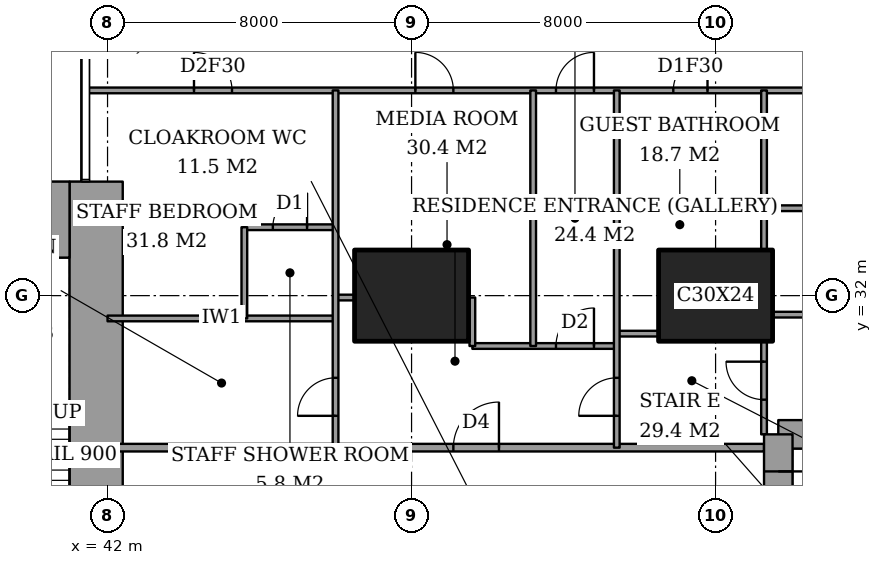
"""IFC4 building model, lengths in metres.
Left out: names, types, materials, properties, quantities, classifications, styles, units other than length and angle.
Written with IfcOpenShell. Run it as: python <this file> out.ifc"""

import sys

from ifc_helpers import new_model, si_unit, direction, frame, frame_2d, origin, origin_2d, place, context, subcontext, project, spatial, rectangle, extrude, element, fill, save


model = new_model("IFC4")
c1 = context("Model", 3, precision=1e-05, world=origin(), true_north=direction((0.0, 1.0)))
c2 = subcontext(c1, "Body", "Model", "MODEL_VIEW")
j1 = project(units=[si_unit("LENGTHUNIT", "METRE"), si_unit("PLANEANGLEUNIT", "RADIAN")], contexts=[c1])
p1 = place(None, origin())
s1 = spatial("IfcSite", under=j1, at=p1, CompositionType="ELEMENT")
p2 = place(p1, origin())
s2 = spatial("IfcBuilding", under=s1, at=p2, CompositionType="ELEMENT")
p3 = place(p2, frame((0.0, 0.0, 270.0)))
s3 = spatial("IfcBuildingStorey", under=s2, at=p3, CompositionType="ELEMENT", Elevation=270.0)
for number, where, z_axis, x_axis in (
    (1, (50.0, 32.0, 0.0), (0.0, 0.0, 1.0), (1.0, 0.0, 0.0)),
    (2, (58.0, 32.0, 0.0), (0.0, 0.0, 1.0), (1.0, 0.0, 0.0)),
):
    element("IfcColumn", number, at=place(p3, frame(where, z_axis=z_axis, x_axis=x_axis)), inside=s3, PredefinedType="COLUMN", context=c2, shape_type="SweptSolid", body=[
        extrude(rectangle(XDim=3.0, YDim=2.4, at=origin_2d()), origin(), (0.0, 0.0, 1.0), 3.6),
    ])
p4 = place(p3, frame((37.85, 34.0, 0.0), z_axis=(0.0, 0.0, 1.0), x_axis=(1.0, 0.0, 0.0)))
e3 = element("IfcWall", 3, at=p4, inside=s3, PredefinedType="SHEAR", context=c2, shape_type="SweptSolid", body=[
    extrude(rectangle(XDim=3.15, YDim=2.0, at=frame_2d((1.575, 0.0))), origin(), (0.0, 0.0, 1.0), 3.6),
])
p5 = place(p3, frame((41.7, 24.85, 0.0), z_axis=(0.0, 0.0, 1.0), x_axis=(0.0, 1.0, 0.0)))
e4 = element("IfcWall", 4, at=p5, inside=s3, PredefinedType="SHEAR", context=c2, shape_type="SweptSolid", body=[
    extrude(rectangle(XDim=10.15, YDim=1.4, at=frame_2d((5.075, 0.0))), origin(), (0.0, 0.0, 1.0), 3.6),
])
p6 = place(p3, frame((64.1, 28.35, 0.0), z_axis=(0.0, 0.0, 1.0), x_axis=(-1.0, 0.0, 0.0)))
e5 = element("IfcWall", 5, at=p6, inside=s3, PredefinedType="SHEAR", context=c2, shape_type="SweptSolid", body=[
    extrude(rectangle(XDim=4.45, YDim=0.75, at=frame_2d((2.225, 0.0))), origin(), (0.0, 0.0, 1.0), 3.6),
])
p7 = place(p3, frame((59.65, 28.35, 0.0), z_axis=(0.0, 0.0, 1.0), x_axis=(0.0, -1.0, 0.0)))
e6 = element("IfcWall", 6, at=p7, inside=s3, PredefinedType="SHEAR", context=c2, shape_type="SweptSolid", body=[
    extrude(rectangle(XDim=8.7, YDim=0.75, at=frame_2d((4.35, 0.0))), origin(), (0.0, 0.0, 1.0), 3.6),
])
p8 = place(p7, frame((0.975, 0.0, 0.0)))
e7 = element("IfcOpeningElement", 7, at=p8, cuts=e6, PredefinedType="OPENING", context=c2, shape_type="SweptSolid", body=[
    extrude(rectangle(XDim=1.0, YDim=2.1, at=frame_2d((0.5, 1.05))), frame((0.0, 0.385, 0.0), z_axis=(0.0, -1.0, 0.0), x_axis=(1.0, 0.0, 0.0)), (0.0, 0.0, 1.0), 0.77),
])
p9 = place(p3, frame((42.0, 28.0, 0.0), z_axis=(0.0, 0.0, 1.0), x_axis=(1.0, 0.0, 0.0)))
e8 = element("IfcWall", 8, at=p9, inside=s3, PredefinedType="PARTITIONING", context=c2, shape_type="SweptSolid", body=[
    extrude(rectangle(XDim=17.275, YDim=0.2, at=frame_2d((8.637, 0.0))), origin(), (0.0, 0.0, 1.0), 3.35),
])
p10 = place(p9, frame((9.1, 0.0, 0.0)))
e9 = element("IfcOpeningElement", 9, at=p10, cuts=e8, PredefinedType="OPENING", context=c2, shape_type="SweptSolid", body=[
    extrude(rectangle(XDim=1.2, YDim=2.4, at=frame_2d((0.6, 1.2))), frame((0.0, 0.11, 0.0), z_axis=(0.0, -1.0, 0.0), x_axis=(1.0, 0.0, 0.0)), (0.0, 0.0, 1.0), 0.22),
])
p11 = place(p3, frame((51.6, 30.675, 0.0), z_axis=(0.0, 0.0, 1.0), x_axis=(1.0, 0.0, 0.0)))
e10 = element("IfcWall", 10, at=p11, inside=s3, PredefinedType="PARTITIONING", context=c2, shape_type="SweptSolid", body=[
    extrude(rectangle(XDim=3.8, YDim=0.15, at=frame_2d((1.9, 0.0))), origin(), (0.0, 0.0, 1.0), 3.35),
])
p12 = place(p11, frame((2.2, 0.0, 0.0)))
e11 = element("IfcOpeningElement", 11, at=p12, cuts=e10, PredefinedType="OPENING", context=c2, shape_type="SweptSolid", body=[
    extrude(rectangle(XDim=1.0, YDim=2.1, at=frame_2d((0.5, 1.05))), frame((0.0, 0.085, 0.0), z_axis=(0.0, -1.0, 0.0), x_axis=(1.0, 0.0, 0.0)), (0.0, 0.0, 1.0), 0.17),
])
p13 = place(p3, frame((55.4, 31.0, 0.0), z_axis=(0.0, 0.0, 1.0), x_axis=(1.0, 0.0, 0.0)))
e12 = element("IfcWall", 12, at=p13, inside=s3, PredefinedType="PARTITIONING", context=c2, shape_type="SweptSolid", body=[
    extrude(rectangle(XDim=1.1, YDim=0.15, at=frame_2d((0.55, 0.0))), origin(), (0.0, 0.0, 1.0), 3.35),
])
p14 = place(p3, frame((42.0, 31.4, 0.0), z_axis=(0.0, 0.0, 1.0), x_axis=(1.0, 0.0, 0.0)))
e13 = element("IfcWall", 13, at=p14, inside=s3, PredefinedType="PARTITIONING", context=c2, shape_type="SweptSolid", body=[
    extrude(rectangle(XDim=6.0, YDim=0.15, at=frame_2d((3.0, 0.0))), origin(), (0.0, 0.0, 1.0), 3.35),
])
p15 = place(p3, frame((59.5, 31.5, 0.0), z_axis=(0.0, 0.0, 1.0), x_axis=(1.0, 0.0, 0.0)))
e14 = element("IfcWall", 14, at=p15, inside=s3, PredefinedType="PARTITIONING", context=c2, shape_type="SweptSolid", body=[
    extrude(rectangle(XDim=5.35, YDim=0.15, at=frame_2d((2.675, 0.0))), origin(), (0.0, 0.0, 1.0), 3.35),
])
p16 = place(p3, frame((48.0, 31.95, 0.0), z_axis=(0.0, 0.0, 1.0), x_axis=(1.0, 0.0, 0.0)))
e15 = element("IfcWall", 15, at=p16, inside=s3, PredefinedType="PARTITIONING", context=c2, shape_type="SweptSolid", body=[
    extrude(rectangle(XDim=0.5, YDim=0.15, at=frame_2d((0.25, 0.0))), origin(), (0.0, 0.0, 1.0), 2.634),
])
p17 = place(p3, frame((45.6, 33.8, 0.0), z_axis=(0.0, 0.0, 1.0), x_axis=(1.0, 0.0, 0.0)))
e16 = element("IfcWall", 16, at=p17, inside=s3, PredefinedType="PARTITIONING", context=c2, shape_type="SweptSolid", body=[
    extrude(rectangle(XDim=2.4, YDim=0.15, at=frame_2d((1.2, 0.0))), origin(), (0.0, 0.0, 1.0), 3.35),
])
p18 = place(p17, frame((0.75, 0.0, 0.0)))
e17 = element("IfcOpeningElement", 17, at=p18, cuts=e16, PredefinedType="OPENING", context=c2, shape_type="SweptSolid", body=[
    extrude(rectangle(XDim=0.9, YDim=2.1, at=frame_2d((0.45, 1.05))), frame((0.0, 0.085, 0.0), z_axis=(0.0, -1.0, 0.0), x_axis=(1.0, 0.0, 0.0)), (0.0, 0.0, 1.0), 0.17),
])
p19 = place(p3, frame((59.275, 34.3, 0.0), z_axis=(0.0, 0.0, 1.0), x_axis=(1.0, 0.0, 0.0)))
e18 = element("IfcWall", 18, at=p19, inside=s3, PredefinedType="PARTITIONING", context=c2, shape_type="SweptSolid", body=[
    extrude(rectangle(XDim=2.6, YDim=0.15, at=frame_2d((1.3, 0.0))), origin(), (0.0, 0.0, 1.0), 3.35),
])
p20 = place(p3, frame((41.439, 37.4, 0.0), z_axis=(0.0, 0.0, 1.0), x_axis=(1.0, 0.0, 0.0)))
e19 = element("IfcWall", 19, at=p20, inside=s3, PredefinedType="PARTITIONING", context=c2, shape_type="SweptSolid", body=[
    extrude(rectangle(XDim=25.011, YDim=0.15, at=frame_2d((12.505, 0.0))), origin(), (0.0, 0.0, 1.0), 3.35),
])
p21 = place(p20, frame((12.361, 0.0, 0.0)))
e20 = element("IfcOpeningElement", 20, at=p21, cuts=e19, PredefinedType="OPENING", context=c2, shape_type="SweptSolid", body=[
    extrude(rectangle(XDim=1.0, YDim=2.1, at=frame_2d((0.5, 1.05))), frame((0.0, 0.085, 0.0), z_axis=(0.0, -1.0, 0.0), x_axis=(1.0, 0.0, 0.0)), (0.0, 0.0, 1.0), 0.17),
])
p22 = place(p20, frame((20.924, 0.0, 0.0)))
e21 = element("IfcOpeningElement", 21, at=p22, cuts=e19, PredefinedType="OPENING", context=c2, shape_type="SweptSolid", body=[
    extrude(rectangle(XDim=1.0, YDim=2.1, at=frame_2d((0.5, 1.05))), frame((0.0, 0.085, 0.0), z_axis=(0.0, -1.0, 0.0), x_axis=(1.0, 0.0, 0.0)), (0.0, 0.0, 1.0), 0.17),
])
p23 = place(p20, frame((15.448, 0.0, 0.0)))
e22 = element("IfcOpeningElement", 22, at=p23, cuts=e19, PredefinedType="OPENING", context=c2, shape_type="SweptSolid", body=[
    extrude(rectangle(XDim=0.9, YDim=2.1, at=frame_2d((0.45, 1.05))), frame((0.0, 0.085, 0.0), z_axis=(0.0, -1.0, 0.0), x_axis=(1.0, 0.0, 0.0)), (0.0, 0.0, 1.0), 0.17),
])
p24 = place(p20, frame((8.661, 0.0, 0.0)))
e23 = element("IfcOpeningElement", 23, at=p24, cuts=e19, PredefinedType="OPENING", context=c2, shape_type="SweptSolid", body=[
    extrude(rectangle(XDim=1.0, YDim=2.1, at=frame_2d((0.5, 1.05))), frame((0.0, 0.085, 0.0), z_axis=(0.0, -1.0, 0.0), x_axis=(1.0, 0.0, 0.0)), (0.0, 0.0, 1.0), 0.17),
])
p25 = place(p20, frame((2.836, 0.0, 0.0)))
e24 = element("IfcOpeningElement", 24, at=p25, cuts=e19, PredefinedType="OPENING", context=c2, shape_type="SweptSolid", body=[
    extrude(rectangle(XDim=1.0, YDim=2.1, at=frame_2d((0.5, 1.05))), frame((0.0, 0.085, 0.0), z_axis=(0.0, -1.0, 0.0), x_axis=(1.0, 0.0, 0.0)), (0.0, 0.0, 1.0), 0.17),
])
p26 = place(p3, frame((45.6, 31.4, 0.0), z_axis=(0.0, 0.0, 1.0), x_axis=(0.0, 1.0, 0.0)))
e25 = element("IfcWall", 25, at=p26, inside=s3, PredefinedType="PARTITIONING", context=c2, shape_type="SweptSolid", body=[
    extrude(rectangle(XDim=2.4, YDim=0.15, at=frame_2d((1.2, 0.0))), origin(), (0.0, 0.0, 1.0), 3.35),
])
p27 = place(p3, frame((48.0, 28.0, 0.0), z_axis=(0.0, 0.0, 1.0), x_axis=(0.0, 1.0, 0.0)))
e26 = element("IfcWall", 26, at=p27, inside=s3, PredefinedType="PARTITIONING", context=c2, shape_type="SweptSolid", body=[
    extrude(rectangle(XDim=9.4, YDim=0.15, at=frame_2d((4.7, 0.0))), origin(), (0.0, 0.0, 1.0), 3.35),
])
p28 = place(p27, frame((0.837, 0.0, 0.0)))
e27 = element("IfcOpeningElement", 27, at=p28, cuts=e26, PredefinedType="OPENING", context=c2, shape_type="SweptSolid", body=[
    extrude(rectangle(XDim=1.0, YDim=2.1, at=frame_2d((0.5, 1.05))), frame((0.0, 0.085, 0.0), z_axis=(0.0, -1.0, 0.0), x_axis=(1.0, 0.0, 0.0)), (0.0, 0.0, 1.0), 0.17),
])
p29 = place(p3, frame((51.6, 30.675, 0.0), z_axis=(0.0, 0.0, 1.0), x_axis=(0.0, 1.0, 0.0)))
e28 = element("IfcWall", 28, at=p29, inside=s3, PredefinedType="PARTITIONING", context=c2, shape_type="SweptSolid", body=[
    extrude(rectangle(XDim=1.275, YDim=0.15, at=frame_2d((0.637, 0.0))), origin(), (0.0, 0.0, 1.0), 3.35),
])
p30 = place(p3, frame((53.2, 30.675, 0.0), z_axis=(0.0, 0.0, 1.0), x_axis=(0.0, 1.0, 0.0)))
e29 = element("IfcWall", 29, at=p30, inside=s3, PredefinedType="PARTITIONING", context=c2, shape_type="SweptSolid", body=[
    extrude(rectangle(XDim=6.725, YDim=0.15, at=frame_2d((3.362, 0.0))), origin(), (0.0, 0.0, 1.0), 3.35),
])
p31 = place(p3, frame((55.4, 28.0, 0.0), z_axis=(0.0, 0.0, 1.0), x_axis=(0.0, 1.0, 0.0)))
e30 = element("IfcWall", 30, at=p31, inside=s3, PredefinedType="PARTITIONING", context=c2, shape_type="SweptSolid", body=[
    extrude(rectangle(XDim=9.4, YDim=0.15, at=frame_2d((4.7, 0.0))), origin(), (0.0, 0.0, 1.0), 3.35),
])
p32 = place(p31, frame((0.837, 0.0, 0.0)))
e31 = element("IfcOpeningElement", 31, at=p32, cuts=e30, PredefinedType="OPENING", context=c2, shape_type="SweptSolid", body=[
    extrude(rectangle(XDim=1.0, YDim=2.1, at=frame_2d((0.5, 1.05))), frame((0.0, 0.085, 0.0), z_axis=(0.0, -1.0, 0.0), x_axis=(1.0, 0.0, 0.0)), (0.0, 0.0, 1.0), 0.17),
])
p33 = place(p3, frame((59.275, 28.35, 0.0), z_axis=(0.0, 0.0, 1.0), x_axis=(0.0, 1.0, 0.0)))
e32 = element("IfcWall", 32, at=p33, inside=s3, PredefinedType="PARTITIONING", context=c2, shape_type="SweptSolid", body=[
    extrude(rectangle(XDim=2.45, YDim=0.15, at=frame_2d((1.225, 0.0))), origin(), (0.0, 0.0, 1.0), 3.35),
])
p34 = place(p33, frame((0.913, 0.0, 0.0)))
e33 = element("IfcOpeningElement", 33, at=p34, cuts=e32, PredefinedType="OPENING", context=c2, shape_type="SweptSolid", body=[
    extrude(rectangle(XDim=1.0, YDim=2.1, at=frame_2d((0.5, 1.05))), frame((0.0, 0.085, 0.0), z_axis=(0.0, -1.0, 0.0), x_axis=(1.0, 0.0, 0.0)), (0.0, 0.0, 1.0), 0.17),
])
p35 = place(p3, frame((59.275, 33.2, 0.0), z_axis=(0.0, 0.0, 1.0), x_axis=(0.0, 1.0, 0.0)))
e34 = element("IfcWall", 34, at=p35, inside=s3, PredefinedType="PARTITIONING", context=c2, shape_type="SweptSolid", body=[
    extrude(rectangle(XDim=4.2, YDim=0.15, at=frame_2d((2.1, 0.0))), origin(), (0.0, 0.0, 1.0), 3.35),
])
p36 = place(p21, origin())
e35 = element("IfcDoor", 35, at=p36, inside=s3, OperationType="SINGLE_SWING_LEFT", PredefinedType="DOOR", context=c2, shape_type="SweptSolid", body=[
    extrude(rectangle(XDim=1.0, YDim=2.1, at=frame_2d((0.5, 1.05))), frame((0.0, 0.025, 0.0), z_axis=(0.0, -1.0, 0.0), x_axis=(1.0, 0.0, 0.0)), (0.0, 0.0, 1.0), 0.05),
])
fill(e20, e35)
p37 = place(p34, origin())
e36 = element("IfcDoor", 36, at=p37, inside=s3, OperationType="SINGLE_SWING_LEFT", PredefinedType="DOOR", context=c2, shape_type="SweptSolid", body=[
    extrude(rectangle(XDim=1.0, YDim=2.1, at=frame_2d((0.5, 1.05))), frame((0.0, 0.025, 0.0), z_axis=(0.0, -1.0, 0.0), x_axis=(1.0, 0.0, 0.0)), (0.0, 0.0, 1.0), 0.05),
])
fill(e33, e36)
p38 = place(p23, origin())
e37 = element("IfcDoor", 37, at=p38, inside=s3, OperationType="SINGLE_SWING_LEFT", PredefinedType="DOOR", context=c2, shape_type="SweptSolid", body=[
    extrude(rectangle(XDim=0.9, YDim=2.1, at=frame_2d((0.45, 1.05))), frame((0.0, 0.025, 0.0), z_axis=(0.0, -1.0, 0.0), x_axis=(1.0, 0.0, 0.0)), (0.0, 0.0, 1.0), 0.05),
])
fill(e22, e37)
p39 = place(p32, origin())
e38 = element("IfcDoor", 38, at=p39, inside=s3, OperationType="SINGLE_SWING_RIGHT", PredefinedType="DOOR", context=c2, shape_type="SweptSolid", body=[
    extrude(rectangle(XDim=1.0, YDim=2.1, at=frame_2d((0.5, 1.05))), frame((0.0, 0.025, 0.0), z_axis=(0.0, -1.0, 0.0), x_axis=(1.0, 0.0, 0.0)), (0.0, 0.0, 1.0), 0.05),
])
fill(e31, e38)
p40 = place(p10, origin())
e39 = element("IfcDoor", 39, at=p40, inside=s3, OperationType="SINGLE_SWING_LEFT", PredefinedType="DOOR", context=c2, shape_type="SweptSolid", body=[
    extrude(rectangle(XDim=1.2, YDim=2.4, at=frame_2d((0.6, 1.2))), frame((0.0, 0.025, 0.0), z_axis=(0.0, -1.0, 0.0), x_axis=(1.0, 0.0, 0.0)), (0.0, 0.0, 1.0), 0.05),
])
fill(e9, e39)
p41 = place(p12, origin())
e40 = element("IfcDoor", 40, at=p41, inside=s3, OperationType="SINGLE_SWING_LEFT", PredefinedType="DOOR", context=c2, shape_type="SweptSolid", body=[
    extrude(rectangle(XDim=1.0, YDim=2.1, at=frame_2d((0.5, 1.05))), frame((0.0, 0.025, 0.0), z_axis=(0.0, -1.0, 0.0), x_axis=(1.0, 0.0, 0.0)), (0.0, 0.0, 1.0), 0.05),
])
fill(e11, e40)
p42 = place(p24, origin())
e41 = element("IfcDoor", 41, at=p42, inside=s3, OperationType="SINGLE_SWING_RIGHT", PredefinedType="DOOR", context=c2, shape_type="SweptSolid", body=[
    extrude(rectangle(XDim=1.0, YDim=2.1, at=frame_2d((0.5, 1.05))), frame((0.0, 0.025, 0.0), z_axis=(0.0, -1.0, 0.0), x_axis=(1.0, 0.0, 0.0)), (0.0, 0.0, 1.0), 0.05),
])
fill(e23, e41)
p43 = place(p18, origin())
e42 = element("IfcDoor", 42, at=p43, inside=s3, OperationType="SINGLE_SWING_LEFT", PredefinedType="DOOR", context=c2, shape_type="SweptSolid", body=[
    extrude(rectangle(XDim=0.9, YDim=2.1, at=frame_2d((0.45, 1.05))), frame((0.0, 0.025, 0.0), z_axis=(0.0, -1.0, 0.0), x_axis=(1.0, 0.0, 0.0)), (0.0, 0.0, 1.0), 0.05),
])
fill(e17, e42)
p44 = place(p25, origin())
e43 = element("IfcDoor", 43, at=p44, inside=s3, OperationType="SINGLE_SWING_RIGHT", PredefinedType="DOOR", context=c2, shape_type="SweptSolid", body=[
    extrude(rectangle(XDim=1.0, YDim=2.1, at=frame_2d((0.5, 1.05))), frame((0.0, 0.025, 0.0), z_axis=(0.0, -1.0, 0.0), x_axis=(1.0, 0.0, 0.0)), (0.0, 0.0, 1.0), 0.05),
])
fill(e24, e43)
p45 = place(p28, origin())
e44 = element("IfcDoor", 44, at=p45, inside=s3, OperationType="SINGLE_SWING_RIGHT", PredefinedType="DOOR", context=c2, shape_type="SweptSolid", body=[
    extrude(rectangle(XDim=1.0, YDim=2.1, at=frame_2d((0.5, 1.05))), frame((0.0, 0.025, 0.0), z_axis=(0.0, -1.0, 0.0), x_axis=(1.0, 0.0, 0.0)), (0.0, 0.0, 1.0), 0.05),
])
fill(e27, e44)
p46 = place(p8, origin())
e45 = element("IfcDoor", 45, at=p46, inside=s3, OperationType="SINGLE_SWING_RIGHT", PredefinedType="DOOR", context=c2, shape_type="SweptSolid", body=[
    extrude(rectangle(XDim=1.0, YDim=2.1, at=frame_2d((0.5, 1.05))), frame((0.0, 0.025, 0.0), z_axis=(0.0, -1.0, 0.0), x_axis=(1.0, 0.0, 0.0)), (0.0, 0.0, 1.0), 0.05),
])
fill(e7, e45)
save(model, sys.argv[1])
